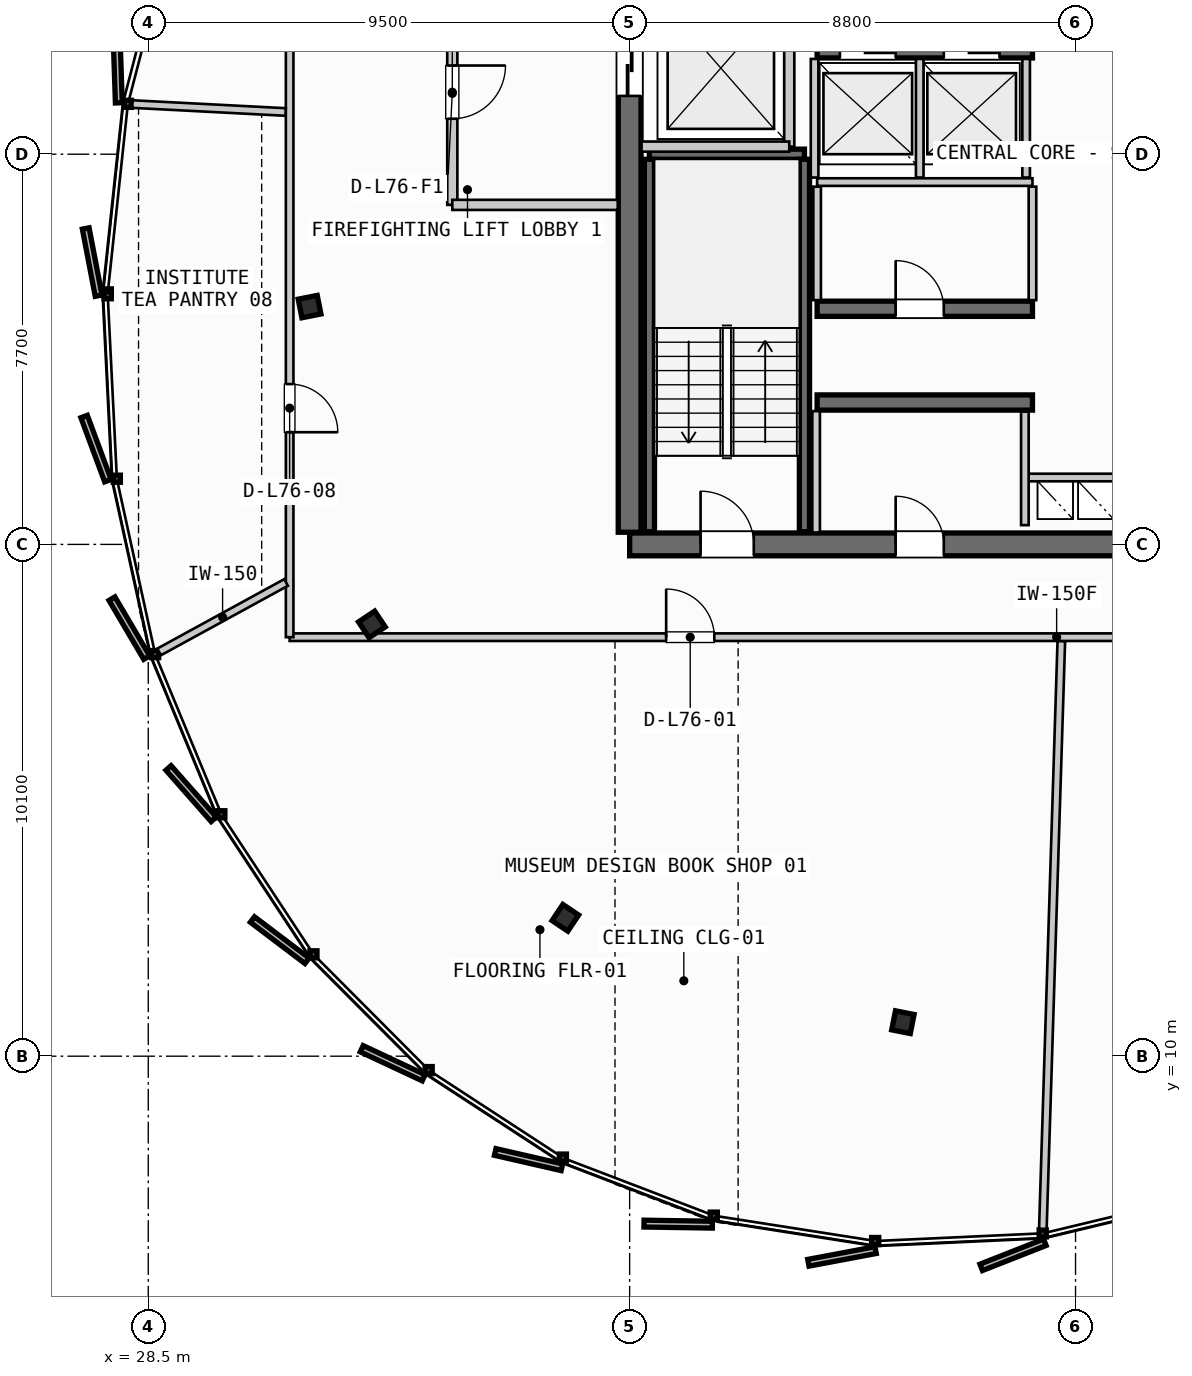
"""IFC4 building model, lengths in metres.
Left out: names, types, materials, properties, quantities, classifications, styles, units other than length and angle.
Written with IfcOpenShell. Run it as: python <this file> out.ifc"""

import sys

from ifc_helpers import new_model, si_unit, direction, frame, frame_2d, origin, origin_2d, place, context, subcontext, project, spatial, rectangle, i_section, extrude, source, transform, mapped, element, fill, save


model = new_model("IFC4")
c1 = context("Model", 3, precision=1e-05, world=origin(), true_north=direction((0.0, 1.0)))
c2 = subcontext(c1, "Body", "Model", "MODEL_VIEW")
j1 = project(units=[si_unit("LENGTHUNIT", "METRE"), si_unit("PLANEANGLEUNIT", "RADIAN")], contexts=[c1])
p1 = place(None, origin())
s1 = spatial("IfcSite", under=j1, at=p1, CompositionType="ELEMENT")
p2 = place(p1, origin())
s2 = spatial("IfcBuilding", under=s1, at=p2, CompositionType="ELEMENT")
p3 = place(p2, frame((0.0, 0.0, 287.05)))
s3 = spatial("IfcBuildingStorey", under=s2, at=p3, CompositionType="ELEMENT", Elevation=287.05)
p4 = place(p3, frame((38.0, 20.1, 0.0), z_axis=(0.0, 0.0, 1.0), x_axis=(1.0, 0.0, 0.0)))
e1 = element("IfcWall", 1, at=p4, inside=s3, PredefinedType="SHEAR", context=c2, shape_type="SweptSolid", body=[
    extrude(rectangle(XDim=17.6, YDim=0.45, at=frame_2d((8.8, 0.0))), origin(), (0.0, 0.0, 1.0), 3.21),
])
p5 = place(p4, frame((1.4, 0.0, 0.0)))
e2 = element("IfcOpeningElement", 2, at=p5, cuts=e1, PredefinedType="OPENING", context=c2, shape_type="SweptSolid", body=[
    extrude(rectangle(XDim=1.05, YDim=2.15, at=frame_2d((0.525, 1.075))), frame((0.0, 0.235, 0.0), z_axis=(0.0, -1.0, 0.0), x_axis=(1.0, 0.0, 0.0)), (0.0, 0.0, 1.0), 0.47),
])
p6 = place(p4, frame((15.15, 0.0, 0.0)))
e3 = element("IfcOpeningElement", 3, at=p6, cuts=e1, PredefinedType="OPENING", context=c2, shape_type="SweptSolid", body=[
    extrude(rectangle(XDim=1.05, YDim=2.15, at=frame_2d((0.525, 1.075))), frame((0.0, 0.235, 0.0), z_axis=(0.0, -1.0, 0.0), x_axis=(1.0, 0.0, 0.0)), (0.0, 0.0, 1.0), 0.47),
])
p7 = place(p4, frame((5.25, 0.0, 0.0)))
e4 = element("IfcOpeningElement", 4, at=p7, cuts=e1, PredefinedType="OPENING", context=c2, shape_type="SweptSolid", body=[
    extrude(rectangle(XDim=0.95, YDim=2.15, at=frame_2d((0.475, 1.075))), frame((0.0, 0.235, 0.0), z_axis=(0.0, -1.0, 0.0), x_axis=(1.0, 0.0, 0.0)), (0.0, 0.0, 1.0), 0.47),
])
p8 = place(p4, frame((11.4, 0.0, 0.0)))
e5 = element("IfcOpeningElement", 5, at=p8, cuts=e1, PredefinedType="OPENING", context=c2, shape_type="SweptSolid", body=[
    extrude(rectangle(XDim=0.95, YDim=2.15, at=frame_2d((0.475, 1.075))), frame((0.0, 0.235, 0.0), z_axis=(0.0, -1.0, 0.0), x_axis=(1.0, 0.0, 0.0)), (0.0, 0.0, 1.0), 0.47),
])
p9 = place(p3, frame((38.0, 35.26, 0.0), z_axis=(0.0, 0.0, 1.0), x_axis=(0.0, -1.0, 0.0)))
e6 = element("IfcWall", 6, at=p9, inside=s3, PredefinedType="SHEAR", context=c2, shape_type="SweptSolid", body=[
    extrude(rectangle(XDim=14.92, YDim=0.45, at=frame_2d((7.46, 0.0))), origin(), (0.0, 0.0, 1.0), 3.21),
])
p10 = place(p9, frame((5.21, 0.0, 0.0)))
e7 = element("IfcOpeningElement", 7, at=p10, cuts=e6, PredefinedType="OPENING", context=c2, shape_type="SweptSolid", body=[
    extrude(rectangle(XDim=1.1, YDim=2.2, at=frame_2d((0.55, 1.1))), frame((0.0, 0.235, 0.0), z_axis=(0.0, -1.0, 0.0), x_axis=(1.0, 0.0, 0.0)), (0.0, 0.0, 1.0), 0.47),
])
p11 = place(p3, frame((41.7, 22.9, 0.0), z_axis=(0.0, 0.0, 1.0), x_axis=(1.0, 0.0, 0.0)))
e8 = element("IfcWall", 8, at=p11, inside=s3, PredefinedType="SHEAR", context=c2, shape_type="SweptSolid", body=[
    extrude(rectangle(XDim=4.25, YDim=0.3, at=frame_2d((2.125, 0.0))), origin(), (0.0, 0.0, 1.0), 3.21),
])
p12 = place(p3, frame((41.7, 24.75, 0.0), z_axis=(0.0, 0.0, 1.0), x_axis=(1.0, 0.0, 0.0)))
e9 = element("IfcWall", 9, at=p12, inside=s3, PredefinedType="SHEAR", context=c2, shape_type="SweptSolid", body=[
    extrude(rectangle(XDim=4.25, YDim=0.3, at=frame_2d((2.125, 0.0))), origin(), (0.0, 0.0, 1.0), 3.21),
])
p13 = place(p12, frame((1.55, 0.0, 0.0)))
e10 = element("IfcOpeningElement", 10, at=p13, cuts=e9, PredefinedType="OPENING", context=c2, shape_type="SweptSolid", body=[
    extrude(rectangle(XDim=0.95, YDim=2.15, at=frame_2d((0.475, 1.075))), frame((0.0, 0.16, 0.0), z_axis=(0.0, -1.0, 0.0), x_axis=(1.0, 0.0, 0.0)), (0.0, 0.0, 1.0), 0.32),
])
p14 = place(p3, frame((41.7, 29.85, 0.0), z_axis=(0.0, 0.0, 1.0), x_axis=(1.0, 0.0, 0.0)))
e11 = element("IfcWall", 11, at=p14, inside=s3, PredefinedType="SHEAR", context=c2, shape_type="SweptSolid", body=[
    extrude(rectangle(XDim=4.25, YDim=0.3, at=frame_2d((2.125, 0.0))), origin(), (0.0, 0.0, 1.0), 3.21),
])
p15 = place(p14, frame((0.45, 0.0, 0.0)))
e12 = element("IfcOpeningElement", 12, at=p15, cuts=e11, PredefinedType="OPENING", context=c2, shape_type="SweptSolid", body=[
    extrude(rectangle(XDim=1.1, YDim=2.2, at=frame_2d((0.55, 1.1))), frame((0.0, 0.16, 0.0), z_axis=(0.0, -1.0, 0.0), x_axis=(1.0, 0.0, 0.0)), (0.0, 0.0, 1.0), 0.32),
])
p16 = place(p14, frame((2.5, 0.0, 0.0)))
e13 = element("IfcOpeningElement", 13, at=p16, cuts=e11, PredefinedType="OPENING", context=c2, shape_type="SweptSolid", body=[
    extrude(rectangle(XDim=1.1, YDim=2.2, at=frame_2d((0.55, 1.1))), frame((0.0, 0.16, 0.0), z_axis=(0.0, -1.0, 0.0), x_axis=(1.0, 0.0, 0.0)), (0.0, 0.0, 1.0), 0.32),
])
m1 = source(origin(), c2, "Body", "SweptSolid", [
    extrude(i_section(OverallWidth=0.374, OverallDepth=0.383, WebThickness=0.017, FlangeThickness=0.026, FilletRadius=0.015, at=origin_2d()), origin(), (0.0, 0.0, 1.0), 3.21),
])
for number, where, z_axis, x_axis in (
    (14, (31.683, 24.793, 0.0), (0.0, 0.0, 1.0), (-0.981, -0.195, 0.0)),
    (15, (32.913, 18.521, 0.0), (0.0, 0.0, 1.0), (-0.831, -0.556, 0.0)),
    (16, (36.731, 12.731, 0.0), (0.0, 0.0, 1.0), (-0.556, -0.831, 0.0)),
    (17, (43.393, 10.671, 0.0), (0.0, 0.0, 1.0), (-0.195, -0.981, 0.0)),
):
    element("IfcColumn", number, at=place(p3, frame(where, z_axis=z_axis, x_axis=x_axis)), inside=s3, PredefinedType="COLUMN", context=c2, shape_type="MappedRepresentation", body=[
        mapped(m1, transform((0.0, 0.0, 0.0), scale=1.0)),
    ])
p17 = place(p3, frame((38.39, 27.8, 0.0), z_axis=(0.0, 0.0, 1.0), x_axis=(1.0, 0.0, 0.0)))
e18 = element("IfcWall", 18, at=p17, inside=s3, PredefinedType="SHEAR", context=c2, shape_type="SweptSolid", body=[
    extrude(rectangle(XDim=3.06, YDim=0.2, at=frame_2d((1.53, 0.0))), origin(), (0.0, 0.0, 1.0), 3.21),
])
for number, where, z_axis, x_axis in (
    (19, (41.45, 27.7, 0.0), (0.0, 0.0, 1.0), (0.0, -1.0, 0.0)),
    (20, (38.39, 20.35, 0.0), (0.0, 0.0, 1.0), (0.0, 1.0, 0.0)),
):
    element("IfcWall", number, at=place(p3, frame(where, z_axis=z_axis, x_axis=x_axis)), inside=s3, PredefinedType="SHEAR", context=c2, shape_type="SweptSolid", body=[
        extrude(rectangle(XDim=7.35, YDim=0.2, at=frame_2d((3.675, 0.0))), origin(), (0.0, 0.0, 1.0), 3.21),
    ])
p18 = place(p3, frame((45.8, 21.42, 0.0), z_axis=(0.0, 0.0, 1.0), x_axis=(1.0, 0.0, 0.0)))
e21 = element("IfcWall", 21, at=p18, inside=s3, PredefinedType="PARTITIONING", context=c2, shape_type="SweptSolid", body=[
    extrude(rectangle(XDim=2.0, YDim=0.15, at=frame_2d((1.0, 0.0))), origin(), (0.0, 0.0, 1.0), 2.315),
])
p19 = place(p3, frame((45.8, 20.48, 0.0), z_axis=(0.0, 0.0, 1.0), x_axis=(0.0, 1.0, 0.0)))
e22 = element("IfcWall", 22, at=p19, inside=s3, PredefinedType="PARTITIONING", context=c2, shape_type="SweptSolid", body=[
    extrude(rectangle(XDim=2.24, YDim=0.15, at=frame_2d((1.12, 0.0))), origin(), (0.0, 0.0, 1.0), 2.315),
])
p20 = place(p3, frame((41.15, 27.95, 0.0), z_axis=(0.0, 0.0, 1.0), x_axis=(0.0, 1.0, 0.0)))
e23 = element("IfcWall", 23, at=p20, inside=s3, PredefinedType="PARTITIONING", context=c2, shape_type="SweptSolid", body=[
    extrude(rectangle(XDim=3.1, YDim=0.2, at=frame_2d((1.55, 0.0))), origin(), (0.0, 0.0, 1.0), 2.315),
])
p21 = place(p3, frame((38.235, 27.95, 0.0), z_axis=(0.0, 0.0, 1.0), x_axis=(1.0, 0.0, 0.0)))
e24 = element("IfcWall", 24, at=p21, inside=s3, PredefinedType="PARTITIONING", context=c2, shape_type="SweptSolid", body=[
    extrude(rectangle(XDim=2.915, YDim=0.2, at=frame_2d((1.458, 0.0))), origin(), (0.0, 0.0, 1.0), 2.315),
])
p22 = place(p3, frame((34.5, 31.2, 0.0), z_axis=(0.0, 0.0, 1.0), x_axis=(0.0, -1.0, 0.0)))
e25 = element("IfcWall", 25, at=p22, inside=s3, PredefinedType="PARTITIONING", context=c2, shape_type="SweptSolid", body=[
    extrude(rectangle(XDim=4.4, YDim=0.2, at=frame_2d((2.2, 0.0))), origin(), (0.0, 0.0, 1.0), 2.315),
])
p23 = place(p22, frame((1.65, 0.0, 0.0)))
e26 = element("IfcOpeningElement", 26, at=p23, cuts=e25, PredefinedType="OPENING", context=c2, shape_type="SweptSolid", body=[
    extrude(rectangle(XDim=1.05, YDim=2.15, at=frame_2d((0.525, 1.075))), frame((0.0, 0.11, 0.0), z_axis=(0.0, -1.0, 0.0), x_axis=(1.0, 0.0, 0.0)), (0.0, 0.0, 1.0), 0.22),
])
p24 = place(p3, frame((34.5, 26.8, 0.0), z_axis=(0.0, 0.0, 1.0), x_axis=(1.0, 0.0, 0.0)))
e27 = element("IfcWall", 27, at=p24, inside=s3, PredefinedType="PARTITIONING", context=c2, shape_type="SweptSolid", body=[
    extrude(rectangle(XDim=3.265, YDim=0.2, at=frame_2d((1.632, 0.0))), origin(), (0.0, 0.0, 1.0), 2.315),
])
p25 = place(p3, frame((41.68, 20.335, 0.0), z_axis=(0.0, 0.0, 1.0), x_axis=(0.0, 1.0, 0.0)))
e28 = element("IfcWall", 28, at=p25, inside=s3, PredefinedType="PARTITIONING", context=c2, shape_type="SweptSolid", body=[
    extrude(rectangle(XDim=2.395, YDim=0.15, at=frame_2d((1.198, 0.0))), origin(), (0.0, 0.0, 1.0), 2.315),
])
p26 = place(p3, frame((41.7, 27.25, 0.0), z_axis=(0.0, 0.0, 1.0), x_axis=(1.0, 0.0, 0.0)))
e29 = element("IfcWall", 29, at=p26, inside=s3, PredefinedType="PARTITIONING", context=c2, shape_type="SweptSolid", body=[
    extrude(rectangle(XDim=4.25, YDim=0.15, at=frame_2d((2.125, 0.0))), origin(), (0.0, 0.0, 1.0), 2.315),
])
for number, where, z_axis, x_axis in (
    (30, (41.7, 24.92, 0.0), (0.0, 0.0, 1.0), (0.0, 1.0, 0.0)),
    (31, (45.95, 24.92, 0.0), (0.0, 0.0, 1.0), (0.0, 1.0, 0.0)),
):
    element("IfcWall", number, at=place(p3, frame(where, z_axis=z_axis, x_axis=x_axis)), inside=s3, PredefinedType="PARTITIONING", context=c2, shape_type="SweptSolid", body=[
        extrude(rectangle(XDim=2.24, YDim=0.15, at=frame_2d((1.12, 0.0))), origin(), (0.0, 0.0, 1.0), 2.315),
    ])
for number, where, z_axis, x_axis in (
    (32, (41.65, 27.34, 0.0), (0.0, 0.0, 1.0), (0.0, 1.0, 0.0)),
    (33, (43.725, 27.34, 0.0), (0.0, 0.0, 1.0), (0.0, 1.0, 0.0)),
    (34, (45.825, 27.34, 0.0), (0.0, 0.0, 1.0), (0.0, 1.0, 0.0)),
):
    element("IfcWall", number, at=place(p3, frame(where, z_axis=z_axis, x_axis=x_axis)), inside=s3, PredefinedType="PARTITIONING", context=c2, shape_type="SweptSolid", body=[
        extrude(rectangle(XDim=2.34, YDim=0.15, at=frame_2d((1.17, 0.0))), origin(), (0.0, 0.0, 1.0), 2.315),
    ])
p27 = place(p3, frame((31.29, 18.269, 0.0), z_axis=(0.0, 0.0, 1.0), x_axis=(1.0, 0.0, 0.0)))
e35 = element("IfcWall", 35, at=p27, inside=s3, PredefinedType="PARTITIONING", context=c2, shape_type="SweptSolid", body=[
    extrude(rectangle(XDim=30.274, YDim=0.15, at=frame_2d((15.137, 0.0))), origin(), (0.0, 0.0, 1.0), 2.315),
])
p28 = place(p27, frame((7.431, 0.0, 0.0)))
e36 = element("IfcOpeningElement", 36, at=p28, cuts=e35, PredefinedType="OPENING", context=c2, shape_type="SweptSolid", body=[
    extrude(rectangle(XDim=0.95, YDim=2.15, at=frame_2d((0.475, 1.075))), frame((0.0, 0.085, 0.0), z_axis=(0.0, -1.0, 0.0), x_axis=(1.0, 0.0, 0.0)), (0.0, 0.0, 1.0), 0.17),
])
p29 = place(p27, frame((21.988, 0.0, 0.0)))
e37 = element("IfcOpeningElement", 37, at=p29, cuts=e35, PredefinedType="OPENING", context=c2, shape_type="SweptSolid", body=[
    extrude(rectangle(XDim=0.95, YDim=2.15, at=frame_2d((0.475, 1.075))), frame((0.0, 0.085, 0.0), z_axis=(0.0, -1.0, 0.0), x_axis=(1.0, 0.0, 0.0)), (0.0, 0.0, 1.0), 0.17),
])
p30 = place(p3, frame((31.29, 37.562, 0.0), z_axis=(0.0, 0.0, 1.0), x_axis=(0.0, -1.0, 0.0)))
e38 = element("IfcWall", 38, at=p30, inside=s3, PredefinedType="PARTITIONING", context=c2, shape_type="SweptSolid", body=[
    extrude(rectangle(XDim=19.293, YDim=0.15, at=frame_2d((9.646, 0.0))), origin(), (0.0, 0.0, 1.0), 2.315),
])
p31 = place(p30, frame((14.298, 0.0, 0.0)))
e39 = element("IfcOpeningElement", 39, at=p31, cuts=e38, PredefinedType="OPENING", context=c2, shape_type="SweptSolid", body=[
    extrude(rectangle(XDim=0.95, YDim=2.15, at=frame_2d((0.475, 1.075))), frame((0.0, 0.085, 0.0), z_axis=(0.0, -1.0, 0.0), x_axis=(1.0, 0.0, 0.0)), (0.0, 0.0, 1.0), 0.17),
])
p32 = place(p3, frame((31.22, 19.348, 0.0), z_axis=(0.0, 0.0, 1.0), x_axis=(-0.877339651922, -0.479869914837, 0.0)))
e40 = element("IfcWall", 40, at=p32, inside=s3, PredefinedType="PARTITIONING", context=c2, shape_type="SweptSolid", body=[
    extrude(rectangle(XDim=2.856, YDim=0.15, at=frame_2d((1.428, 0.0))), origin(), (0.0, 0.0, 1.0), 2.315),
])
p33 = place(p3, frame((46.519, 18.189, 0.0), z_axis=(0.0, 0.0, 1.0), x_axis=(-0.031395702938, -0.99950703341, 0.0)))
e41 = element("IfcWall", 41, at=p33, inside=s3, PredefinedType="PARTITIONING", context=c2, shape_type="SweptSolid", body=[
    extrude(rectangle(XDim=11.602, YDim=0.15, at=frame_2d((5.801, 0.0))), origin(), (0.0, 0.0, 1.0), 2.315),
])
p34 = place(p3, frame((31.21, 28.633, 0.0), z_axis=(0.0, 0.0, 1.0), x_axis=(-0.998658304719, 0.051784074924, 0.0)))
e42 = element("IfcWall", 42, at=p34, inside=s3, PredefinedType="PARTITIONING", context=c2, shape_type="SweptSolid", body=[
    extrude(rectangle(XDim=3.027, YDim=0.15, at=frame_2d((1.513, 0.0))), origin(), (0.0, 0.0, 1.0), 2.315),
])
m2 = source(origin(), c2, "Body", "SweptSolid", [
    extrude(rectangle(XDim=1.05, YDim=2.15, at=frame_2d((0.525, 1.075))), frame((0.0, 0.025, 0.0), z_axis=(0.0, -1.0, 0.0), x_axis=(1.0, 0.0, 0.0)), (0.0, 0.0, 1.0), 0.05),
])
p35 = place(p5, origin())
e43 = element("IfcDoor", 43, at=p35, inside=s3, OperationType="SINGLE_SWING_LEFT", PredefinedType="DOOR", context=c2, shape_type="MappedRepresentation", body=[
    mapped(m2, transform((0.0, 0.0, 0.0), scale=1.0)),
])
fill(e2, e43)
m3 = source(origin(), c2, "Body", "SweptSolid", [
    extrude(rectangle(XDim=1.1, YDim=2.2, at=frame_2d((0.55, 1.1))), frame((0.0, 0.025, 0.0), z_axis=(0.0, -1.0, 0.0), x_axis=(1.0, 0.0, 0.0)), (0.0, 0.0, 1.0), 0.05),
])
p36 = place(p10, origin())
e44 = element("IfcDoor", 44, at=p36, inside=s3, OperationType="SLIDING_TO_LEFT", PredefinedType="DOOR", context=c2, shape_type="MappedRepresentation", body=[
    mapped(m3, transform((0.0, 0.0, 0.0), scale=1.0)),
])
fill(e7, e44)
m4 = source(origin(), c2, "Body", "SweptSolid", [
    extrude(rectangle(XDim=0.95, YDim=2.15, at=frame_2d((0.475, 1.075))), frame((0.0, 0.025, 0.0), z_axis=(0.0, -1.0, 0.0), x_axis=(1.0, 0.0, 0.0)), (0.0, 0.0, 1.0), 0.05),
])
p37 = place(p7, origin())
e45 = element("IfcDoor", 45, at=p37, inside=s3, OperationType="SINGLE_SWING_LEFT", PredefinedType="DOOR", context=c2, shape_type="MappedRepresentation", body=[
    mapped(m4, transform((0.0, 0.0, 0.0), scale=1.0)),
])
fill(e4, e45)
p38 = place(p13, origin())
e46 = element("IfcDoor", 46, at=p38, inside=s3, OperationType="SINGLE_SWING_LEFT", PredefinedType="DOOR", context=c2, shape_type="MappedRepresentation", body=[
    mapped(m4, transform((0.0, 0.0, 0.0), scale=1.0)),
])
fill(e10, e46)
p39 = place(p23, origin())
e47 = element("IfcDoor", 47, at=p39, inside=s3, OperationType="SINGLE_SWING_LEFT", PredefinedType="DOOR", context=c2, shape_type="MappedRepresentation", body=[
    mapped(m2, transform((0.0, 0.0, 0.0), scale=1.0)),
])
fill(e26, e47)
p40 = place(p28, origin())
e48 = element("IfcDoor", 48, at=p40, inside=s3, OperationType="SINGLE_SWING_LEFT", PredefinedType="DOOR", context=c2, shape_type="MappedRepresentation", body=[
    mapped(m4, transform((0.0, 0.0, 0.0), scale=1.0)),
])
fill(e36, e48)
p41 = place(p31, origin())
e49 = element("IfcDoor", 49, at=p41, inside=s3, OperationType="SINGLE_SWING_RIGHT", PredefinedType="DOOR", context=c2, shape_type="MappedRepresentation", body=[
    mapped(m4, transform((0.0, 0.0, 0.0), scale=1.0)),
])
fill(e39, e49)
save(model, sys.argv[1])
